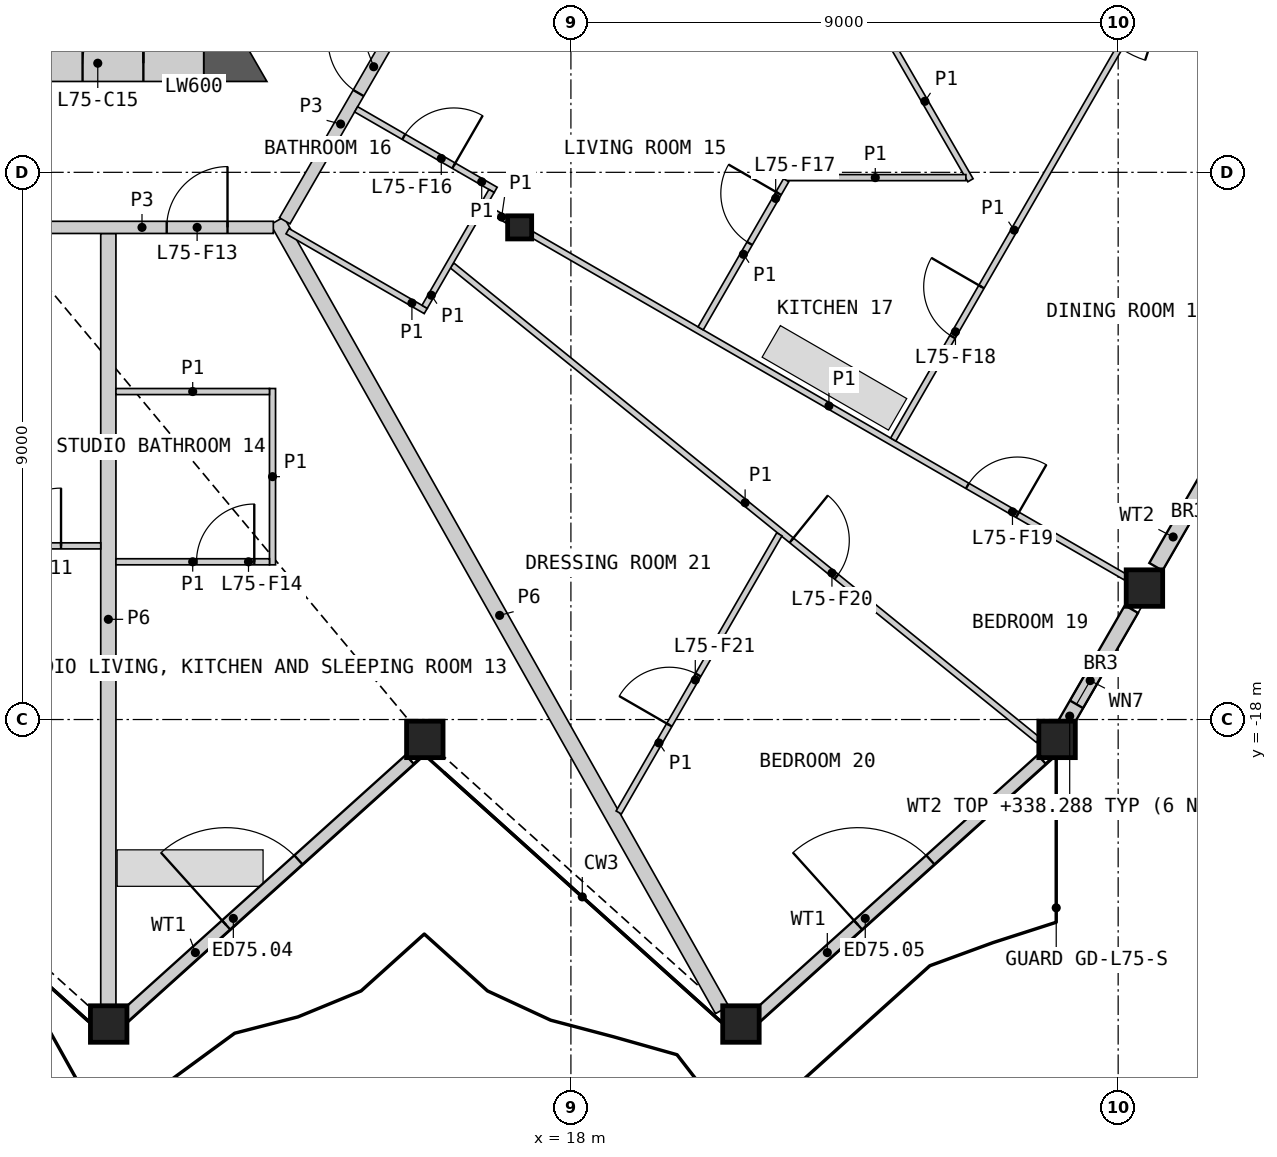
"""IFC4 building model, lengths in metres.
Left out: names, types, materials, properties, quantities, classifications, styles, units other than length and angle.
Written with IfcOpenShell. Run it as: python <this file> out.ifc"""

import sys

from ifc_helpers import new_model, si_unit, direction, frame, frame_2d, origin, origin_2d, place, context, subcontext, project, spatial, polyline, rectangle, hollow_rectangle, i_section, outline, extrude, element, fill, save


model = new_model("IFC4")
c1 = context("Model", 3, precision=1e-05, world=origin(), true_north=direction((0.0, 1.0)))
c2 = subcontext(c1, "Body", "Model", "MODEL_VIEW")
j1 = project(units=[si_unit("LENGTHUNIT", "METRE"), si_unit("PLANEANGLEUNIT", "RADIAN")], contexts=[c1])
p1 = place(None, origin())
s1 = spatial("IfcSite", under=j1, at=p1, CompositionType="ELEMENT")
p2 = place(p1, origin())
s2 = spatial("IfcBuilding", under=s1, at=p2, CompositionType="ELEMENT")
p3 = place(p2, frame((0.0, 0.0, 335.8)))
s3 = spatial("IfcBuildingStorey", under=s2, at=p3, CompositionType="ELEMENT", Elevation=335.8)
for number, where, z_axis, x_axis in (
    (1, (10.398, -23.008, 0.0), (0.0, 0.0, 1.0), (1.0, 0.0, 0.0)),
    (2, (15.597, -18.327, 0.0), (0.0, 0.0, 1.0), (1.0, 0.0, 0.0)),
    (3, (20.796, -23.008, 0.0), (0.0, 0.0, 1.0), (1.0, 0.0, 0.0)),
    (4, (25.995, -18.327, 0.0), (0.0, 0.0, 1.0), (1.0, 0.0, 0.0)),
    (5, (27.432, -15.838, 0.0), (0.0, 0.0, 1.0), (1.0, 0.0, 0.0)),
):
    element("IfcColumn", number, at=place(p3, frame(where, z_axis=z_axis, x_axis=x_axis)), inside=s3, PredefinedType="COLUMN", context=c2, shape_type="SweptSolid", body=[
        extrude(hollow_rectangle(XDim=0.6, YDim=0.6, WallThickness=0.04, at=origin_2d()), origin(), (0.0, 0.0, 1.0), 3.4),
    ])
p4 = place(p3, frame((17.157, -9.906, 0.0), z_axis=(0.0, 0.0, 1.0), x_axis=(1.0, 0.0, 0.0)))
e6 = element("IfcColumn", 6, at=p4, inside=s3, PredefinedType="COLUMN", context=c2, shape_type="SweptSolid", body=[
    extrude(i_section(OverallWidth=0.396, OverallDepth=0.381, WebThickness=0.019, FlangeThickness=0.03, at=origin_2d()), origin(), (0.0, 0.0, 1.0), 3.4),
])
p5 = place(p3, frame((10.648, -22.892, 0.0), z_axis=(0.0, 0.0, 1.0), x_axis=(0.743136819733, 0.669139497532, 0.0)))
e7 = element("IfcWall", 7, at=p5, inside=s3, PredefinedType="SOLIDWALL", context=c2, shape_type="SweptSolid", body=[
    extrude(rectangle(XDim=6.328, YDim=0.2, at=frame_2d((3.164, 0.0))), origin(), (0.0, 0.0, 1.0), 2.488),
])
p6 = place(p5, frame((2.262, 0.0, 0.0)))
e8 = element("IfcOpeningElement", 8, at=p6, cuts=e7, PredefinedType="OPENING", context=c2, shape_type="SweptSolid", body=[
    extrude(rectangle(XDim=1.6, YDim=2.25, at=frame_2d((0.8, 1.125))), frame((0.0, 0.11, 0.0), z_axis=(0.0, -1.0, 0.0), x_axis=(1.0, 0.0, 0.0)), (0.0, 0.0, 1.0), 0.22),
])
p7 = place(p3, frame((21.041, -22.892, 0.0), z_axis=(0.0, 0.0, 1.0), x_axis=(0.743129180176, 0.669147981818, 0.0)))
e9 = element("IfcWall", 9, at=p7, inside=s3, PredefinedType="SOLIDWALL", context=c2, shape_type="SweptSolid", body=[
    extrude(rectangle(XDim=6.33, YDim=0.2, at=frame_2d((3.165, 0.0))), origin(), (0.0, 0.0, 1.0), 2.488),
])
p8 = place(p7, frame((2.262, 0.0, 0.0)))
e10 = element("IfcOpeningElement", 10, at=p8, cuts=e9, PredefinedType="OPENING", context=c2, shape_type="SweptSolid", body=[
    extrude(rectangle(XDim=1.6, YDim=2.25, at=frame_2d((0.8, 1.125))), frame((0.0, 0.11, 0.0), z_axis=(0.0, -1.0, 0.0), x_axis=(1.0, 0.0, 0.0)), (0.0, 0.0, 1.0), 0.22),
])
p9 = place(p3, frame((26.09, -18.139, 0.0), z_axis=(0.0, 0.0, 1.0), x_axis=(0.500046963369, 0.865998287773, 0.0)))
e11 = element("IfcWall", 11, at=p9, inside=s3, PredefinedType="SOLIDWALL", context=c2, shape_type="SweptSolid", body=[
    extrude(rectangle(XDim=2.258, YDim=0.25, at=frame_2d((1.129, 0.0))), origin(), (0.0, 0.0, 1.0), 2.488),
])
p10 = place(p9, frame((0.45, 0.0, 1.6)))
e12 = element("IfcOpeningElement", 12, at=p10, cuts=e11, PredefinedType="OPENING", context=c2, shape_type="SweptSolid", body=[
    extrude(rectangle(XDim=0.9, YDim=0.6, at=frame_2d((0.45, 0.3))), frame((0.0, 0.135, 0.0), z_axis=(0.0, -1.0, 0.0), x_axis=(1.0, 0.0, 0.0)), (0.0, 0.0, 1.0), 0.27),
])
p11 = place(p3, frame((27.621, -15.488, 0.0), z_axis=(0.0, 0.0, 1.0), x_axis=(0.49996174997, 0.866047486323, 0.0)))
e13 = element("IfcWall", 13, at=p11, inside=s3, PredefinedType="SOLIDWALL", context=c2, shape_type="SweptSolid", body=[
    extrude(rectangle(XDim=2.267, YDim=0.25, at=frame_2d((1.133, 0.0))), origin(), (0.0, 0.0, 1.0), 2.488),
])
p12 = place(p3, origin())
e14 = element("IfcWall", 14, at=p12, inside=s3, PredefinedType="SHEAR", context=c2, shape_type="SweptSolid", body=[
    extrude(outline(polyline([(11.961, -7.506), (11.961, -6.906), (12.48, -6.606), (13.0, -7.506), (11.961, -7.506)])), origin(), (0.0, 0.0, 1.0), 3.1),
])
p13 = place(p3, frame((9.369, -7.206, 0.0), z_axis=(0.0, 0.0, 1.0), x_axis=(1.0, 0.0, 0.0)))
e15 = element("IfcWall", 15, at=p13, inside=s3, PredefinedType="SHEAR", context=c2, shape_type="SweptSolid", body=[
    extrude(rectangle(XDim=2.592, YDim=0.6, at=frame_2d((1.296, 0.0))), origin(), (0.0, 0.0, 1.0), 3.1),
])
p14 = place(p13, frame((0.6, 0.0, 0.0)))
e16 = element("IfcOpeningElement", 16, at=p14, cuts=e15, PredefinedType="OPENING", context=c2, shape_type="SweptSolid", body=[
    extrude(rectangle(XDim=1.0, YDim=2.1, at=frame_2d((0.5, 1.05))), frame((0.0, 0.31, 0.0), z_axis=(0.0, -1.0, 0.0), x_axis=(1.0, 0.0, 0.0)), (0.0, 0.0, 1.0), 0.62),
])
p15 = place(p3, frame((13.169, -9.797, 0.0), z_axis=(0.0, 0.0, 1.0), x_axis=(0.4910591841, -0.871126212274, 0.0)))
e17 = element("IfcWall", 17, at=p15, inside=s3, PredefinedType="PARTITIONING", context=c2, shape_type="SweptSolid", body=[
    extrude(rectangle(XDim=14.9, YDim=0.25, at=frame_2d((7.45, 0.0))), origin(), (0.0, 0.0, 1.0), 2.33),
])
p16 = place(p3, frame((10.393, -22.698, 0.0), z_axis=(0.0, 0.0, 1.0), x_axis=(0.0, 1.0, 0.0)))
e18 = element("IfcWall", 18, at=p16, inside=s3, PredefinedType="PARTITIONING", context=c2, shape_type="SweptSolid", body=[
    extrude(rectangle(XDim=12.692, YDim=0.25, at=frame_2d((6.346, 0.0))), origin(), (0.0, 0.0, 1.0), 2.33),
])
p17 = place(p3, frame((8.786, -9.906, 0.0), z_axis=(0.0, 0.0, 1.0), x_axis=(1.0, 0.0, 0.0)))
e19 = element("IfcWall", 19, at=p17, inside=s3, PredefinedType="PARTITIONING", context=c2, shape_type="SweptSolid", body=[
    extrude(rectangle(XDim=4.32, YDim=0.2, at=frame_2d((2.16, 0.0))), origin(), (0.0, 0.0, 1.0), 3.1),
])
p18 = place(p17, frame((2.566, 0.0, 0.0)))
e20 = element("IfcOpeningElement", 20, at=p18, cuts=e19, PredefinedType="OPENING", context=c2, shape_type="SweptSolid", body=[
    extrude(rectangle(XDim=1.0, YDim=2.1, at=frame_2d((0.5, 1.05))), frame((0.0, 0.11, 0.0), z_axis=(0.0, -1.0, 0.0), x_axis=(1.0, 0.0, 0.0)), (0.0, 0.0, 1.0), 0.22),
])
p19 = place(p3, frame((13.293, -9.797, 0.0), z_axis=(0.0, 0.0, 1.0), x_axis=(0.499967746641, 0.866044024469, 0.0)))
e21 = element("IfcWall", 21, at=p19, inside=s3, PredefinedType="PARTITIONING", context=c2, shape_type="SweptSolid", body=[
    extrude(rectangle(XDim=3.676, YDim=0.2, at=frame_2d((1.838, 0.0))), origin(), (0.0, 0.0, 1.0), 3.1),
])
p20 = place(p19, frame((2.426, 0.0, 0.0)))
e22 = element("IfcOpeningElement", 22, at=p20, cuts=e21, PredefinedType="OPENING", context=c2, shape_type="SweptSolid", body=[
    extrude(rectangle(XDim=1.0, YDim=2.1, at=frame_2d((0.5, 1.05))), frame((0.0, 0.11, 0.0), z_axis=(0.0, -1.0, 0.0), x_axis=(1.0, 0.0, 0.0)), (0.0, 0.0, 1.0), 0.22),
])
p21 = place(p3, frame((16.044, -10.531, 0.0), z_axis=(0.0, 0.0, 1.0), x_axis=(0.777141742697, -0.629325600749, 0.0)))
e23 = element("IfcWall", 23, at=p21, inside=s3, PredefinedType="PARTITIONING", context=c2, shape_type="SweptSolid", body=[
    extrude(rectangle(XDim=12.406, YDim=0.1, at=frame_2d((6.203, 0.0))), origin(), (0.0, 0.0, 1.0), 2.33),
])
p22 = place(p21, frame((7.185, 0.0, 0.0)))
e24 = element("IfcOpeningElement", 24, at=p22, cuts=e23, PredefinedType="OPENING", context=c2, shape_type="SweptSolid", body=[
    extrude(rectangle(XDim=0.95, YDim=2.1, at=frame_2d((0.475, 1.05))), frame((0.0, 0.06, 0.0), z_axis=(0.0, -1.0, 0.0), x_axis=(1.0, 0.0, 0.0)), (0.0, 0.0, 1.0), 0.12),
])
p23 = place(p3, frame((17.365, -10.025, 0.0), z_axis=(0.0, 0.0, 1.0), x_axis=(0.866021046153, -0.500007547564, 0.0)))
e25 = element("IfcWall", 25, at=p23, inside=s3, PredefinedType="PARTITIONING", context=c2, shape_type="SweptSolid", body=[
    extrude(rectangle(XDim=11.267, YDim=0.1, at=frame_2d((5.634, 0.0))), origin(), (0.0, 0.0, 1.0), 2.33),
])
p24 = place(p23, frame((8.264, 0.0, 0.0)))
e26 = element("IfcOpeningElement", 26, at=p24, cuts=e25, PredefinedType="OPENING", context=c2, shape_type="SweptSolid", body=[
    extrude(rectangle(XDim=0.95, YDim=2.1, at=frame_2d((0.475, 1.05))), frame((0.0, 0.06, 0.0), z_axis=(0.0, -1.0, 0.0), x_axis=(1.0, 0.0, 0.0)), (0.0, 0.0, 1.0), 0.12),
])
p25 = place(p3, frame((0.05, -15.144, 0.0), z_axis=(0.0, 0.0, 1.0), x_axis=(1.0, 0.0, 0.0)))
e27 = element("IfcWall", 27, at=p25, inside=s3, PredefinedType="PARTITIONING", context=c2, shape_type="SweptSolid", body=[
    extrude(rectangle(XDim=10.218, YDim=0.1, at=frame_2d((5.109, 0.0))), origin(), (0.0, 0.0, 1.0), 2.33),
])
p26 = place(p25, frame((0.855, 0.0, 0.0)))
e28 = element("IfcOpeningElement", 28, at=p26, cuts=e27, PredefinedType="OPENING", context=c2, shape_type="SweptSolid", body=[
    extrude(rectangle(XDim=0.95, YDim=2.1, at=frame_2d((0.475, 1.05))), frame((0.0, 0.06, 0.0), z_axis=(0.0, -1.0, 0.0), x_axis=(1.0, 0.0, 0.0)), (0.0, 0.0, 1.0), 0.12),
])
p27 = place(p25, frame((8.615, 0.0, 0.0)))
e29 = element("IfcOpeningElement", 29, at=p27, cuts=e27, PredefinedType="OPENING", context=c2, shape_type="SweptSolid", body=[
    extrude(rectangle(XDim=0.95, YDim=2.1, at=frame_2d((0.475, 1.05))), frame((0.0, 0.06, 0.0), z_axis=(0.0, -1.0, 0.0), x_axis=(1.0, 0.0, 0.0)), (0.0, 0.0, 1.0), 0.12),
])
p28 = place(p3, frame((23.301, -13.395, 0.0), z_axis=(0.0, 0.0, 1.0), x_axis=(0.500017325895, 0.866015400443, 0.0)))
e30 = element("IfcWall", 30, at=p28, inside=s3, PredefinedType="PARTITIONING", context=c2, shape_type="SweptSolid", body=[
    extrude(rectangle(XDim=7.955, YDim=0.1, at=frame_2d((3.978, 0.0))), origin(), (0.0, 0.0, 1.0), 2.33),
])
p29 = place(p28, frame((1.951, 0.0, 0.0)))
e31 = element("IfcOpeningElement", 31, at=p29, cuts=e30, PredefinedType="OPENING", context=c2, shape_type="SweptSolid", body=[
    extrude(rectangle(XDim=0.95, YDim=2.1, at=frame_2d((0.475, 1.05))), frame((0.0, 0.06, 0.0), z_axis=(0.0, -1.0, 0.0), x_axis=(1.0, 0.0, 0.0)), (0.0, 0.0, 1.0), 0.12),
])
p30 = place(p3, frame((18.787, -19.529, 0.0), z_axis=(0.0, 0.0, 1.0), x_axis=(0.499986503906, 0.866033195618, 0.0)))
e32 = element("IfcWall", 32, at=p30, inside=s3, PredefinedType="PARTITIONING", context=c2, shape_type="SweptSolid", body=[
    extrude(rectangle(XDim=5.282, YDim=0.1, at=frame_2d((2.641, 0.0))), origin(), (0.0, 0.0, 1.0), 2.33),
])
p31 = place(p30, frame((1.662, 0.0, 0.0)))
e33 = element("IfcOpeningElement", 33, at=p31, cuts=e32, PredefinedType="OPENING", context=c2, shape_type="SweptSolid", body=[
    extrude(rectangle(XDim=0.95, YDim=2.1, at=frame_2d((0.475, 1.05))), frame((0.0, 0.06, 0.0), z_axis=(0.0, -1.0, 0.0), x_axis=(1.0, 0.0, 0.0)), (0.0, 0.0, 1.0), 0.12),
])
p32 = place(p3, frame((23.072, -6.533, 0.0), z_axis=(0.0, 0.0, 1.0), x_axis=(0.500009026289, -0.866020192391, 0.0)))
e34 = element("IfcWall", 34, at=p32, inside=s3, PredefinedType="PARTITIONING", context=c2, shape_type="SweptSolid", body=[
    extrude(rectangle(XDim=2.999, YDim=0.1, at=frame_2d((1.5, 0.0))), origin(), (0.0, 0.0, 1.0), 2.33),
])
p33 = place(p3, frame((21.515, -9.087, 0.0), z_axis=(0.0, 0.0, 1.0), x_axis=(1.0, 0.0, 0.0)))
e35 = element("IfcWall", 35, at=p33, inside=s3, PredefinedType="PARTITIONING", context=c2, shape_type="SweptSolid", body=[
    extrude(rectangle(XDim=2.981, YDim=0.1, at=frame_2d((1.49, 0.0))), origin(), (0.0, 0.0, 1.0), 2.33),
])
p34 = place(p3, frame((20.134, -11.566, 0.0), z_axis=(0.0, 0.0, 1.0), x_axis=(0.499947857008, 0.866055506462, 0.0)))
e36 = element("IfcWall", 36, at=p34, inside=s3, PredefinedType="PARTITIONING", context=c2, shape_type="SweptSolid", body=[
    extrude(rectangle(XDim=2.813, YDim=0.1, at=frame_2d((1.406, 0.0))), origin(), (0.0, 0.0, 1.0), 2.33),
])
p35 = place(p34, frame((1.613, 0.0, 0.0)))
e37 = element("IfcOpeningElement", 37, at=p35, cuts=e36, PredefinedType="OPENING", context=c2, shape_type="SweptSolid", body=[
    extrude(rectangle(XDim=0.95, YDim=2.1, at=frame_2d((0.475, 1.05))), frame((0.0, 0.06, 0.0), z_axis=(0.0, -1.0, 0.0), x_axis=(1.0, 0.0, 0.0)), (0.0, 0.0, 1.0), 0.12),
])
p36 = place(p3, frame((13.093, -15.456, 0.0), z_axis=(0.0, 0.0, 1.0), x_axis=(0.0, 1.0, 0.0)))
e38 = element("IfcWall", 38, at=p36, inside=s3, PredefinedType="PARTITIONING", context=c2, shape_type="SweptSolid", body=[
    extrude(rectangle(XDim=2.9, YDim=0.1, at=frame_2d((1.45, 0.0))), origin(), (0.0, 0.0, 1.0), 2.33),
])
p37 = place(p3, frame((10.518, -12.606, 0.0), z_axis=(0.0, 0.0, 1.0), x_axis=(1.0, 0.0, 0.0)))
e39 = element("IfcWall", 39, at=p37, inside=s3, PredefinedType="PARTITIONING", context=c2, shape_type="SweptSolid", body=[
    extrude(rectangle(XDim=2.525, YDim=0.1, at=frame_2d((1.262, 0.0))), origin(), (0.0, 0.0, 1.0), 2.33),
])
p38 = place(p3, frame((10.518, -15.406, 0.0), z_axis=(0.0, 0.0, 1.0), x_axis=(1.0, 0.0, 0.0)))
e40 = element("IfcWall", 40, at=p38, inside=s3, PredefinedType="PARTITIONING", context=c2, shape_type="SweptSolid", body=[
    extrude(rectangle(XDim=2.525, YDim=0.1, at=frame_2d((1.262, 0.0))), origin(), (0.0, 0.0, 1.0), 2.33),
])
p39 = place(p38, frame((1.325, 0.0, 0.0)))
e41 = element("IfcOpeningElement", 41, at=p39, cuts=e40, PredefinedType="OPENING", context=c2, shape_type="SweptSolid", body=[
    extrude(rectangle(XDim=0.95, YDim=2.1, at=frame_2d((0.475, 1.05))), frame((0.0, 0.06, 0.0), z_axis=(0.0, -1.0, 0.0), x_axis=(1.0, 0.0, 0.0)), (0.0, 0.0, 1.0), 0.12),
])
p40 = place(p3, frame((14.468, -7.964, 0.0), z_axis=(0.0, 0.0, 1.0), x_axis=(0.865989200783, -0.500062700197, 0.0)))
e42 = element("IfcWall", 42, at=p40, inside=s3, PredefinedType="PARTITIONING", context=c2, shape_type="SweptSolid", body=[
    extrude(rectangle(XDim=2.65, YDim=0.1, at=frame_2d((1.325, 0.0))), origin(), (0.0, 0.0, 1.0), 2.33),
])
p41 = place(p40, frame((0.905, 0.0, 0.0)))
e43 = element("IfcOpeningElement", 43, at=p41, cuts=e42, PredefinedType="OPENING", context=c2, shape_type="SweptSolid", body=[
    extrude(rectangle(XDim=0.95, YDim=2.1, at=frame_2d((0.475, 1.05))), frame((0.0, 0.06, 0.0), z_axis=(0.0, -1.0, 0.0), x_axis=(1.0, 0.0, 0.0)), (0.0, 0.0, 1.0), 0.12),
])
p42 = place(p3, frame((13.339, -9.968, 0.0), z_axis=(0.0, 0.0, 1.0), x_axis=(0.866036909293, -0.499980071345, 0.0)))
e44 = element("IfcWall", 44, at=p42, inside=s3, PredefinedType="PARTITIONING", context=c2, shape_type="SweptSolid", body=[
    extrude(rectangle(XDim=2.625, YDim=0.1, at=frame_2d((1.312, 0.0))), origin(), (0.0, 0.0, 1.0), 2.33),
])
p43 = place(p3, frame((15.594, -11.212, 0.0), z_axis=(0.0, 0.0, 1.0), x_axis=(0.499898558967, 0.866083962871, 0.0)))
e45 = element("IfcWall", 45, at=p43, inside=s3, PredefinedType="PARTITIONING", context=c2, shape_type="SweptSolid", body=[
    extrude(rectangle(XDim=2.2, YDim=0.1, at=frame_2d((1.1, 0.0))), origin(), (0.0, 0.0, 1.0), 2.33),
])
p44 = place(p3, frame((16.594, -9.581, 0.0), z_axis=(0.0, 0.0, 1.0), x_axis=(0.866036909293, -0.499980071345, 0.0)))
e46 = element("IfcWall", 46, at=p44, inside=s3, PredefinedType="PARTITIONING", context=c2, shape_type="SweptSolid", body=[
    extrude(rectangle(XDim=0.41, YDim=0.1, at=frame_2d((0.205, 0.0))), origin(), (0.0, 0.0, 1.0), 2.33),
])
p45 = place(p6, origin())
e47 = element("IfcDoor", 47, at=p45, inside=s3, OperationType="DOUBLE_DOOR_SINGLE_SWING", PredefinedType="DOOR", context=c2, shape_type="SweptSolid", body=[
    extrude(rectangle(XDim=1.6, YDim=2.25, at=frame_2d((0.8, 1.125))), frame((0.0, 0.025, 0.0), z_axis=(0.0, -1.0, 0.0), x_axis=(1.0, 0.0, 0.0)), (0.0, 0.0, 1.0), 0.05),
])
fill(e8, e47)
p46 = place(p8, origin())
e48 = element("IfcDoor", 48, at=p46, inside=s3, OperationType="DOUBLE_DOOR_SINGLE_SWING", PredefinedType="DOOR", context=c2, shape_type="SweptSolid", body=[
    extrude(rectangle(XDim=1.6, YDim=2.25, at=frame_2d((0.8, 1.125))), frame((0.0, 0.025, 0.0), z_axis=(0.0, -1.0, 0.0), x_axis=(1.0, 0.0, 0.0)), (0.0, 0.0, 1.0), 0.05),
])
fill(e10, e48)
p47 = place(p10, origin())
e49 = element("IfcWindow", 49, at=p47, inside=s3, PartitioningType="SINGLE_PANEL", PredefinedType="WINDOW", context=c2, shape_type="SweptSolid", body=[
    extrude(rectangle(XDim=0.9, YDim=0.6, at=frame_2d((0.45, 0.3))), frame((0.0, 0.03, 0.0), z_axis=(0.0, -1.0, 0.0), x_axis=(1.0, 0.0, 0.0)), (0.0, 0.0, 1.0), 0.06),
])
fill(e12, e49)
p48 = place(p14, origin())
e50 = element("IfcDoor", 50, at=p48, inside=s3, OperationType="SINGLE_SWING_RIGHT", PredefinedType="DOOR", context=c2, shape_type="SweptSolid", body=[
    extrude(rectangle(XDim=1.0, YDim=2.1, at=frame_2d((0.5, 1.05))), frame((0.0, 0.055, 0.0), z_axis=(0.0, -1.0, 0.0), x_axis=(1.0, 0.0, 0.0)), (0.0, 0.0, 1.0), 0.05),
])
fill(e16, e50)
p49 = place(p27, origin())
e51 = element("IfcDoor", 51, at=p49, inside=s3, OperationType="SINGLE_SWING_RIGHT", PredefinedType="DOOR", context=c2, shape_type="SweptSolid", body=[
    extrude(rectangle(XDim=0.95, YDim=2.1, at=frame_2d((0.475, 1.05))), frame((0.0, 0.025, 0.0), z_axis=(0.0, -1.0, 0.0), x_axis=(1.0, 0.0, 0.0)), (0.0, 0.0, 1.0), 0.05),
])
fill(e29, e51)
p50 = place(p18, origin())
e52 = element("IfcDoor", 52, at=p50, inside=s3, OperationType="SINGLE_SWING_RIGHT", PredefinedType="DOOR", context=c2, shape_type="SweptSolid", body=[
    extrude(rectangle(XDim=1.0, YDim=2.1, at=frame_2d((0.5, 1.05))), frame((0.0, 0.025, 0.0), z_axis=(0.0, -1.0, 0.0), x_axis=(1.0, 0.0, 0.0)), (0.0, 0.0, 1.0), 0.05),
])
fill(e20, e52)
p51 = place(p39, origin())
e53 = element("IfcDoor", 53, at=p51, inside=s3, OperationType="SINGLE_SWING_RIGHT", PredefinedType="DOOR", context=c2, shape_type="SweptSolid", body=[
    extrude(rectangle(XDim=0.95, YDim=2.1, at=frame_2d((0.475, 1.05))), frame((0.0, 0.025, 0.0), z_axis=(0.0, -1.0, 0.0), x_axis=(1.0, 0.0, 0.0)), (0.0, 0.0, 1.0), 0.05),
])
fill(e41, e53)
p52 = place(p20, origin())
e54 = element("IfcDoor", 54, at=p52, inside=s3, OperationType="SINGLE_SWING_RIGHT", PredefinedType="DOOR", context=c2, shape_type="SweptSolid", body=[
    extrude(rectangle(XDim=1.0, YDim=2.1, at=frame_2d((0.5, 1.05))), frame((0.0, 0.025, 0.0), z_axis=(0.0, -1.0, 0.0), x_axis=(1.0, 0.0, 0.0)), (0.0, 0.0, 1.0), 0.05),
])
fill(e22, e54)
p53 = place(p41, origin())
e55 = element("IfcDoor", 55, at=p53, inside=s3, OperationType="SINGLE_SWING_RIGHT", PredefinedType="DOOR", context=c2, shape_type="SweptSolid", body=[
    extrude(rectangle(XDim=0.95, YDim=2.1, at=frame_2d((0.475, 1.05))), frame((0.0, 0.025, 0.0), z_axis=(0.0, -1.0, 0.0), x_axis=(1.0, 0.0, 0.0)), (0.0, 0.0, 1.0), 0.05),
])
fill(e43, e55)
p54 = place(p35, origin())
e56 = element("IfcDoor", 56, at=p54, inside=s3, OperationType="SINGLE_SWING_RIGHT", PredefinedType="DOOR", context=c2, shape_type="SweptSolid", body=[
    extrude(rectangle(XDim=0.95, YDim=2.1, at=frame_2d((0.475, 1.05))), frame((0.0, 0.025, 0.0), z_axis=(0.0, -1.0, 0.0), x_axis=(1.0, 0.0, 0.0)), (0.0, 0.0, 1.0), 0.05),
])
fill(e37, e56)
p55 = place(p29, origin())
e57 = element("IfcDoor", 57, at=p55, inside=s3, OperationType="SINGLE_SWING_RIGHT", PredefinedType="DOOR", context=c2, shape_type="SweptSolid", body=[
    extrude(rectangle(XDim=0.95, YDim=2.1, at=frame_2d((0.475, 1.05))), frame((0.0, 0.025, 0.0), z_axis=(0.0, -1.0, 0.0), x_axis=(1.0, 0.0, 0.0)), (0.0, 0.0, 1.0), 0.05),
])
fill(e31, e57)
p56 = place(p24, origin())
e58 = element("IfcDoor", 58, at=p56, inside=s3, OperationType="SINGLE_SWING_RIGHT", PredefinedType="DOOR", context=c2, shape_type="SweptSolid", body=[
    extrude(rectangle(XDim=0.95, YDim=2.1, at=frame_2d((0.475, 1.05))), frame((0.0, 0.025, 0.0), z_axis=(0.0, -1.0, 0.0), x_axis=(1.0, 0.0, 0.0)), (0.0, 0.0, 1.0), 0.05),
])
fill(e26, e58)
p57 = place(p22, origin())
e59 = element("IfcDoor", 59, at=p57, inside=s3, OperationType="SINGLE_SWING_LEFT", PredefinedType="DOOR", context=c2, shape_type="SweptSolid", body=[
    extrude(rectangle(XDim=0.95, YDim=2.1, at=frame_2d((0.475, 1.05))), frame((0.0, 0.025, 0.0), z_axis=(0.0, -1.0, 0.0), x_axis=(1.0, 0.0, 0.0)), (0.0, 0.0, 1.0), 0.05),
])
fill(e24, e59)
p58 = place(p31, origin())
e60 = element("IfcDoor", 60, at=p58, inside=s3, OperationType="SINGLE_SWING_LEFT", PredefinedType="DOOR", context=c2, shape_type="SweptSolid", body=[
    extrude(rectangle(XDim=0.95, YDim=2.1, at=frame_2d((0.475, 1.05))), frame((0.0, 0.025, 0.0), z_axis=(0.0, -1.0, 0.0), x_axis=(1.0, 0.0, 0.0)), (0.0, 0.0, 1.0), 0.05),
])
fill(e33, e60)
save(model, sys.argv[1])
